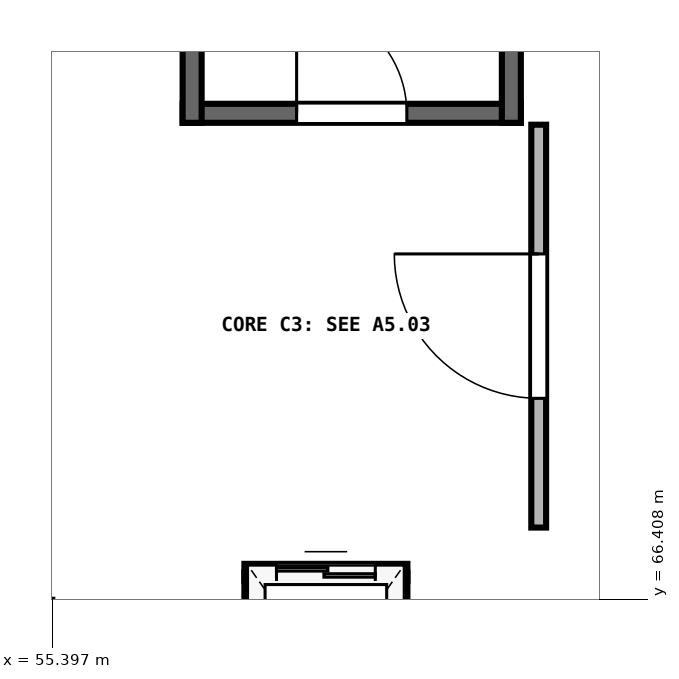
"""IFC4 building model, lengths in metres.
Left out: names, types, materials, properties, quantities, classifications, styles, units other than length and angle.
Written with IfcOpenShell. Run it as: python <this file> out.ifc"""

import sys

from ifc_helpers import new_model, si_unit, direction, frame, frame_2d, origin, origin_2d, place, context, subcontext, project, spatial, rectangle, extrude, element, fill, save


model = new_model("IFC4")
c1 = context("Model", 3, precision=1e-05, world=origin(), true_north=direction((0.0, 1.0)))
c2 = subcontext(c1, "Body", "Model", "MODEL_VIEW")
j1 = project(units=[si_unit("LENGTHUNIT", "METRE"), si_unit("PLANEANGLEUNIT", "RADIAN")], contexts=[c1])
p1 = place(None, origin())
s1 = spatial("IfcSite", under=j1, at=p1, CompositionType="ELEMENT")
p2 = place(p1, origin())
s2 = spatial("IfcBuilding", under=s1, at=p2, CompositionType="ELEMENT")
p3 = place(p2, frame((0.0, 0.0, 5.4)))
s3 = spatial("IfcBuildingStorey", under=s2, at=p3, CompositionType="ELEMENT", Elevation=5.4)
p4 = place(p3, frame((55.0, 66.0, 0.0), z_axis=(0.0, 0.0, 1.0), x_axis=(1.0, 0.0, 0.0)))
e1 = element("IfcColumn", 1, at=p4, inside=s3, PredefinedType="COLUMN", context=c2, shape_type="SweptSolid", body=[
    extrude(rectangle(XDim=0.8, YDim=0.8, at=origin_2d()), origin(), (0.0, 0.0, 1.0), 4.54),
])
p5 = place(p3, frame((57.115, 72.8, 0.0), z_axis=(0.0, 0.0, 1.0), x_axis=(1.0, 0.0, 0.0)))
e2 = element("IfcWall", 2, at=p5, inside=s3, PredefinedType="SHEAR", context=c2, shape_type="SweptSolid", body=[
    extrude(rectangle(XDim=4.45, YDim=0.25, at=frame_2d((2.225, 0.0))), origin(), (0.0, 0.0, 1.0), 4.54),
])
p6 = place(p5, frame((1.5, 0.0, 0.0)))
e3 = element("IfcOpeningElement", 3, at=p6, cuts=e2, PredefinedType="OPENING", context=c2, shape_type="SweptSolid", body=[
    extrude(rectangle(XDim=1.45, YDim=2.2, at=frame_2d((0.725, 1.1))), frame((0.0, 0.135, 0.0), z_axis=(0.0, -1.0, 0.0), x_axis=(1.0, 0.0, 0.0)), (0.0, 0.0, 1.0), 0.27),
])
for number, where, z_axis, x_axis in (
    (4, (57.24, 72.675, 0.0), (0.0, 0.0, 1.0), (0.0, 1.0, 0.0)),
    (5, (61.44, 72.675, 0.0), (0.0, 0.0, 1.0), (0.0, 1.0, 0.0)),
):
    element("IfcWall", number, at=place(p3, frame(where, z_axis=z_axis, x_axis=x_axis)), inside=s3, PredefinedType="SHEAR", context=c2, shape_type="SweptSolid", body=[
        extrude(rectangle(XDim=11.09, YDim=0.25, at=frame_2d((5.545, 0.0))), origin(), (0.0, 0.0, 1.0), 4.54),
    ])
p7 = place(p3, frame((61.8, 67.35, 0.0), z_axis=(0.0, 0.0, 1.0), x_axis=(0.0, 1.0, 0.0)))
e6 = element("IfcWall", 6, at=p7, inside=s3, PredefinedType="PARTITIONING", context=c2, shape_type="SweptSolid", body=[
    extrude(rectangle(XDim=5.3, YDim=0.195, at=frame_2d((2.65, 0.0))), origin(), (0.0, 0.0, 1.0), 4.49),
])
p8 = place(p7, frame((1.7, 0.0, 0.0)))
e7 = element("IfcOpeningElement", 7, at=p8, cuts=e6, PredefinedType="OPENING", context=c2, shape_type="SweptSolid", body=[
    extrude(rectangle(XDim=1.9, YDim=2.3, at=frame_2d((0.95, 1.15))), frame((0.0, 0.107, 0.0), z_axis=(0.0, -1.0, 0.0), x_axis=(1.0, 0.0, 0.0)), (0.0, 0.0, 1.0), 0.215),
])
p9 = place(p3, frame((57.927, 66.76, 0.0), z_axis=(0.0, 0.0, 1.0), x_axis=(1.0, 0.0, 0.0)))
e8 = element("IfcWall", 8, at=p9, inside=s3, PredefinedType="SOLIDWALL", context=c2, shape_type="SweptSolid", body=[
    extrude(rectangle(XDim=2.145, YDim=0.225, at=frame_2d((1.073, 0.0))), origin(), (0.0, 0.0, 1.0), 4.49),
])
p10 = place(p9, frame((0.423, 0.0, 0.0)))
e9 = element("IfcOpeningElement", 9, at=p10, cuts=e8, PredefinedType="OPENING", context=c2, shape_type="SweptSolid", body=[
    extrude(rectangle(XDim=1.3, YDim=2.25, at=frame_2d((0.65, 1.125))), frame((0.0, 0.123, 0.0), z_axis=(0.0, -1.0, 0.0), x_axis=(1.0, 0.0, 0.0)), (0.0, 0.0, 1.0), 0.245),
])
for number, where, z_axis, x_axis in (
    (10, (58.04, 64.04, 0.0), (0.0, 0.0, 1.0), (0.0, 1.0, 0.0)),
    (11, (59.96, 64.04, 0.0), (0.0, 0.0, 1.0), (0.0, 1.0, 0.0)),
):
    element("IfcWall", number, at=place(p3, frame(where, z_axis=z_axis, x_axis=x_axis)), inside=s3, PredefinedType="SOLIDWALL", context=c2, shape_type="SweptSolid", body=[
        extrude(rectangle(XDim=2.72, YDim=0.225, at=frame_2d((1.36, 0.0))), origin(), (0.0, 0.0, 1.0), 4.49),
    ])
p11 = place(p6, origin())
e12 = element("IfcDoor", 12, at=p11, inside=s3, OperationType="SINGLE_SWING_LEFT", PredefinedType="DOOR", context=c2, shape_type="SweptSolid", body=[
    extrude(rectangle(XDim=1.45, YDim=2.2, at=frame_2d((0.725, 1.1))), frame((0.0, 0.025, 0.0), z_axis=(0.0, -1.0, 0.0), x_axis=(1.0, 0.0, 0.0)), (0.0, 0.0, 1.0), 0.05),
])
fill(e3, e12)
p12 = place(p8, origin())
e13 = element("IfcDoor", 13, at=p12, inside=s3, OperationType="SINGLE_SWING_RIGHT", PredefinedType="DOOR", context=c2, shape_type="SweptSolid", body=[
    extrude(rectangle(XDim=1.9, YDim=2.3, at=frame_2d((0.95, 1.15))), frame((0.0, 0.025, 0.0), z_axis=(0.0, -1.0, 0.0), x_axis=(1.0, 0.0, 0.0)), (0.0, 0.0, 1.0), 0.05),
])
fill(e7, e13)
p13 = place(p10, origin())
e14 = element("IfcDoor", 14, at=p13, inside=s3, OperationType="DOUBLE_DOOR_SLIDING", PredefinedType="DOOR", context=c2, shape_type="SweptSolid", body=[
    extrude(rectangle(XDim=1.3, YDim=2.25, at=frame_2d((0.65, 1.125))), frame((0.0, 0.025, 0.0), z_axis=(0.0, -1.0, 0.0), x_axis=(1.0, 0.0, 0.0)), (0.0, 0.0, 1.0), 0.05),
])
fill(e9, e14)
save(model, sys.argv[1])
